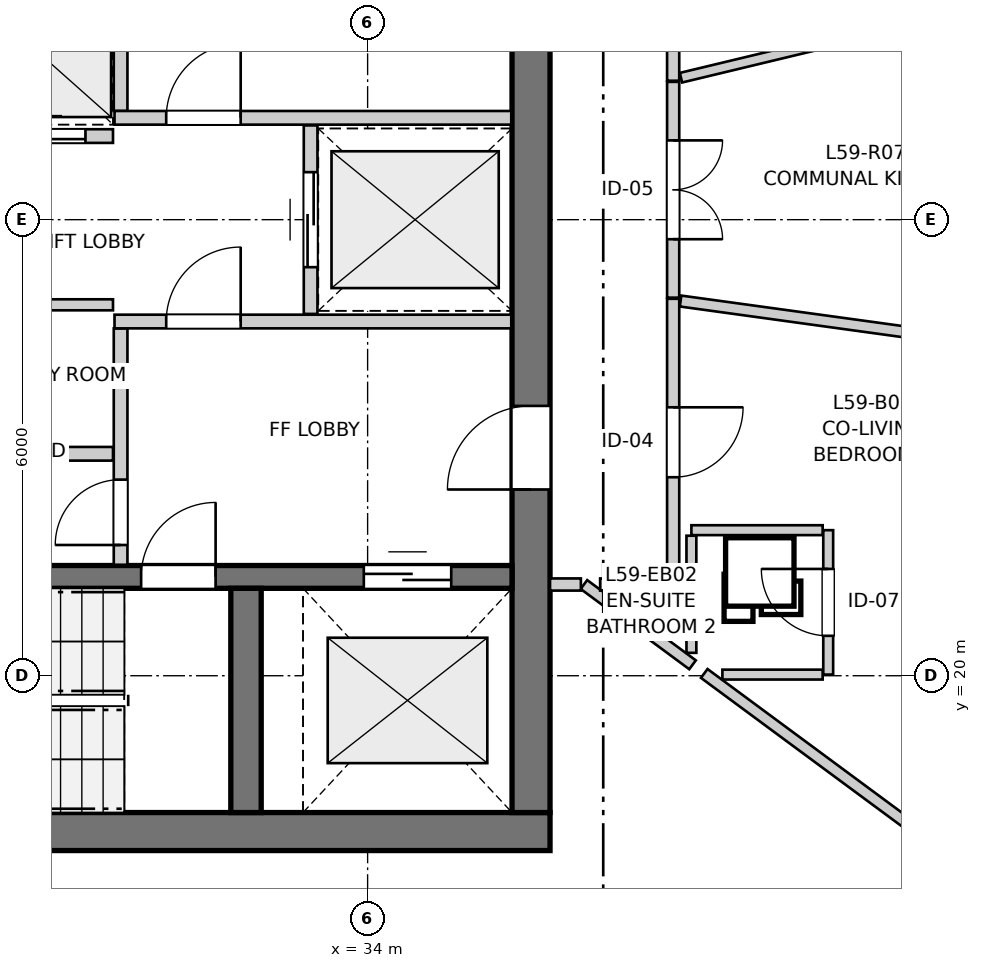
"""IFC4 building model, lengths in metres.
Left out: names, types, materials, properties, quantities, classifications, styles, units other than length and angle.
Written with IfcOpenShell. Run it as: python <this file> out.ifc"""

import sys

from ifc_helpers import new_model, si_unit, direction, frame, frame_2d, origin, place, context, subcontext, project, spatial, rectangle, extrude, source, transform, mapped, element, fill, save


model = new_model("IFC4")
c1 = context("Model", 3, precision=1e-05, world=origin(), true_north=direction((0.0, 1.0)))
c2 = subcontext(c1, "Body", "Model", "MODEL_VIEW")
j1 = project(units=[si_unit("LENGTHUNIT", "METRE"), si_unit("PLANEANGLEUNIT", "RADIAN")], contexts=[c1])
p1 = place(None, origin())
s1 = spatial("IfcSite", under=j1, at=p1, CompositionType="ELEMENT")
p2 = place(p1, origin())
s2 = spatial("IfcBuilding", under=s1, at=p2, CompositionType="ELEMENT")
p3 = place(p2, frame((0.0, 0.0, 198.8)))
s3 = spatial("IfcBuildingStorey", under=s2, at=p3, CompositionType="ELEMENT", Elevation=198.8)
p4 = place(p3, frame((24.3, 17.95, 0.0), z_axis=(0.0, 0.0, 1.0), x_axis=(1.0, 0.0, 0.0)))
e1 = element("IfcWall", 1, at=p4, inside=s3, PredefinedType="SHEAR", context=c2, shape_type="SweptSolid", body=[
    extrude(rectangle(XDim=12.1, YDim=0.5, at=frame_2d((6.05, 0.0))), origin(), (0.0, 0.0, 1.0), 2.96),
])
p5 = place(p3, frame((36.15, 18.2, 0.0), z_axis=(0.0, 0.0, 1.0), x_axis=(0.0, 1.0, 0.0)))
e2 = element("IfcWall", 2, at=p5, inside=s3, PredefinedType="SHEAR", context=c2, shape_type="SweptSolid", body=[
    extrude(rectangle(XDim=15.6, YDim=0.5, at=frame_2d((7.8, 0.0))), origin(), (0.0, 0.0, 1.0), 2.96),
])
p6 = place(p5, frame((4.25, 0.0, 0.0)))
e3 = element("IfcOpeningElement", 3, at=p6, cuts=e2, PredefinedType="OPENING", context=c2, shape_type="SweptSolid", body=[
    extrude(rectangle(XDim=1.1, YDim=2.15, at=frame_2d((0.55, 1.075))), frame((0.0, 0.26, 0.0), z_axis=(0.0, -1.0, 0.0), x_axis=(1.0, 0.0, 0.0)), (0.0, 0.0, 1.0), 0.52),
])
p7 = place(p5, frame((10.25, 0.0, 0.0)))
e4 = element("IfcOpeningElement", 4, at=p7, cuts=e2, PredefinedType="OPENING", context=c2, shape_type="SweptSolid", body=[
    extrude(rectangle(XDim=1.1, YDim=2.15, at=frame_2d((0.55, 1.075))), frame((0.0, 0.26, 0.0), z_axis=(0.0, -1.0, 0.0), x_axis=(1.0, 0.0, 0.0)), (0.0, 0.0, 1.0), 0.52),
])
p8 = place(p3, frame((24.8, 21.3, 0.0), z_axis=(0.0, 0.0, 1.0), x_axis=(1.0, 0.0, 0.0)))
e5 = element("IfcWall", 5, at=p8, inside=s3, PredefinedType="SHEAR", context=c2, shape_type="SweptSolid", body=[
    extrude(rectangle(XDim=11.1, YDim=0.3, at=frame_2d((5.55, 0.0))), origin(), (0.0, 0.0, 1.0), 2.96),
])
p9 = place(p8, frame((6.22, 0.0, 0.0)))
e6 = element("IfcOpeningElement", 6, at=p9, cuts=e5, PredefinedType="OPENING", context=c2, shape_type="SweptSolid", body=[
    extrude(rectangle(XDim=0.98, YDim=2.15, at=frame_2d((0.49, 1.075))), frame((0.0, 0.16, 0.0), z_axis=(0.0, -1.0, 0.0), x_axis=(1.0, 0.0, 0.0)), (0.0, 0.0, 1.0), 0.32),
])
p10 = place(p8, frame((9.15, 0.0, 0.0)))
e7 = element("IfcOpeningElement", 7, at=p10, cuts=e5, PredefinedType="OPENING", context=c2, shape_type="SweptSolid", body=[
    extrude(rectangle(XDim=1.15, YDim=2.15, at=frame_2d((0.575, 1.075))), frame((0.0, 0.16, 0.0), z_axis=(0.0, -1.0, 0.0), x_axis=(1.0, 0.0, 0.0)), (0.0, 0.0, 1.0), 0.32),
])
p11 = place(p3, frame((32.4, 18.2, 0.0), z_axis=(0.0, 0.0, 1.0), x_axis=(0.0, 1.0, 0.0)))
e8 = element("IfcWall", 8, at=p11, inside=s3, PredefinedType="SHEAR", context=c2, shape_type="SweptSolid", body=[
    extrude(rectangle(XDim=2.95, YDim=0.4, at=frame_2d((1.475, 0.0))), origin(), (0.0, 0.0, 1.0), 2.96),
])
p12 = place(p3, frame((41.107, 16.748, 0.0), z_axis=(0.0, 0.0, 1.0), x_axis=(0.257000958827, 0.966411148095, 0.0)))
e9 = element("IfcWall", 9, at=p12, inside=s3, PredefinedType="SOLIDWALL", context=c2, shape_type="SweptSolid", body=[
    extrude(rectangle(XDim=2.343, YDim=0.32, at=frame_2d((1.171, 0.0))), origin(), (0.0, 0.0, 1.0), 2.58),
])
p13 = place(p12, frame((0.343, 0.0, 0.82)))
e10 = element("IfcOpeningElement", 10, at=p13, cuts=e9, PredefinedType="OPENING", context=c2, shape_type="SweptSolid", body=[
    extrude(rectangle(XDim=0.58, YDim=1.35, at=frame_2d((0.29, 0.675))), frame((0.0, 0.17, 0.0), z_axis=(0.0, -1.0, 0.0), x_axis=(1.0, 0.0, 0.0)), (0.0, 0.0, 1.0), 0.34),
])
p14 = place(p12, frame((1.399, 0.0, 0.82)))
e11 = element("IfcOpeningElement", 11, at=p14, cuts=e9, PredefinedType="OPENING", context=c2, shape_type="SweptSolid", body=[
    extrude(rectangle(XDim=0.58, YDim=1.35, at=frame_2d((0.29, 0.675))), frame((0.0, 0.17, 0.0), z_axis=(0.0, -1.0, 0.0), x_axis=(1.0, 0.0, 0.0)), (0.0, 0.0, 1.0), 0.34),
])
p15 = place(p3, frame((30.75, 21.46, 0.0), z_axis=(0.0, 0.0, 1.0), x_axis=(0.0, 1.0, 0.0)))
e12 = element("IfcWall", 12, at=p15, inside=s3, PredefinedType="PARTITIONING", context=c2, shape_type="SweptSolid", body=[
    extrude(rectangle(XDim=3.11, YDim=0.18, at=frame_2d((1.555, 0.0))), origin(), (0.0, 0.0, 1.0), 2.96),
])
p16 = place(p15, frame((0.26, 0.0, 0.0)))
e13 = element("IfcOpeningElement", 13, at=p16, cuts=e12, PredefinedType="OPENING", context=c2, shape_type="SweptSolid", body=[
    extrude(rectangle(XDim=0.86, YDim=2.05, at=frame_2d((0.43, 1.025))), frame((0.0, 0.1, 0.0), z_axis=(0.0, -1.0, 0.0), x_axis=(1.0, 0.0, 0.0)), (0.0, 0.0, 1.0), 0.2),
])
p17 = place(p3, frame((30.67, 24.66, 0.0), z_axis=(0.0, 0.0, 1.0), x_axis=(1.0, 0.0, 0.0)))
e14 = element("IfcWall", 14, at=p17, inside=s3, PredefinedType="PARTITIONING", context=c2, shape_type="SweptSolid", body=[
    extrude(rectangle(XDim=5.22, YDim=0.18, at=frame_2d((2.61, 0.0))), origin(), (0.0, 0.0, 1.0), 2.96),
])
p18 = place(p17, frame((0.68, 0.0, 0.0)))
e15 = element("IfcOpeningElement", 15, at=p18, cuts=e14, PredefinedType="OPENING", context=c2, shape_type="SweptSolid", body=[
    extrude(rectangle(XDim=0.98, YDim=2.15, at=frame_2d((0.49, 1.075))), frame((0.0, 0.1, 0.0), z_axis=(0.0, -1.0, 0.0), x_axis=(1.0, 0.0, 0.0)), (0.0, 0.0, 1.0), 0.2),
])
p19 = place(p3, frame((30.75, 27.43, 0.0), z_axis=(0.0, 0.0, 1.0), x_axis=(0.0, 1.0, 0.0)))
e16 = element("IfcWall", 16, at=p19, inside=s3, PredefinedType="PARTITIONING", context=c2, shape_type="SweptSolid", body=[
    extrude(rectangle(XDim=3.11, YDim=0.18, at=frame_2d((1.555, 0.0))), origin(), (0.0, 0.0, 1.0), 2.96),
])
p20 = place(p19, frame((1.98, 0.0, 0.0)))
e17 = element("IfcOpeningElement", 17, at=p20, cuts=e16, PredefinedType="OPENING", context=c2, shape_type="SweptSolid", body=[
    extrude(rectangle(XDim=0.86, YDim=2.05, at=frame_2d((0.43, 1.025))), frame((0.0, 0.1, 0.0), z_axis=(0.0, -1.0, 0.0), x_axis=(1.0, 0.0, 0.0)), (0.0, 0.0, 1.0), 0.2),
])
p21 = place(p3, frame((30.67, 27.34, 0.0), z_axis=(0.0, 0.0, 1.0), x_axis=(1.0, 0.0, 0.0)))
e18 = element("IfcWall", 18, at=p21, inside=s3, PredefinedType="PARTITIONING", context=c2, shape_type="SweptSolid", body=[
    extrude(rectangle(XDim=5.22, YDim=0.18, at=frame_2d((2.61, 0.0))), origin(), (0.0, 0.0, 1.0), 2.96),
])
p22 = place(p21, frame((0.68, 0.0, 0.0)))
e19 = element("IfcOpeningElement", 19, at=p22, cuts=e18, PredefinedType="OPENING", context=c2, shape_type="SweptSolid", body=[
    extrude(rectangle(XDim=0.98, YDim=2.15, at=frame_2d((0.49, 1.075))), frame((0.0, 0.1, 0.0), z_axis=(0.0, -1.0, 0.0), x_axis=(1.0, 0.0, 0.0)), (0.0, 0.0, 1.0), 0.2),
])
p23 = place(p3, frame((33.25, 24.76, 0.0), z_axis=(0.0, 0.0, 1.0), x_axis=(0.0, 1.0, 0.0)))
e20 = element("IfcWall", 20, at=p23, inside=s3, PredefinedType="PARTITIONING", context=c2, shape_type="SweptSolid", body=[
    extrude(rectangle(XDim=2.48, YDim=0.18, at=frame_2d((1.24, 0.0))), origin(), (0.0, 0.0, 1.0), 2.96),
])
p24 = place(p23, frame((0.615, 0.0, 0.0)))
e21 = element("IfcOpeningElement", 21, at=p24, cuts=e20, PredefinedType="OPENING", context=c2, shape_type="SweptSolid", body=[
    extrude(rectangle(XDim=1.25, YDim=2.15, at=frame_2d((0.625, 1.075))), frame((0.0, 0.1, 0.0), z_axis=(0.0, -1.0, 0.0), x_axis=(1.0, 0.0, 0.0)), (0.0, 0.0, 1.0), 0.2),
])
p25 = place(p3, frame((24.81, 22.92, 0.0), z_axis=(0.0, 0.0, 1.0), x_axis=(1.0, 0.0, 0.0)))
e22 = element("IfcWall", 22, at=p25, inside=s3, PredefinedType="PARTITIONING", context=c2, shape_type="SweptSolid", body=[
    extrude(rectangle(XDim=5.84, YDim=0.18, at=frame_2d((2.92, 0.0))), origin(), (0.0, 0.0, 1.0), 2.96),
])
p26 = place(p3, frame((24.81, 24.88, 0.0), z_axis=(0.0, 0.0, 1.0), x_axis=(1.0, 0.0, 0.0)))
e23 = element("IfcWall", 23, at=p26, inside=s3, PredefinedType="PARTITIONING", context=c2, shape_type="SweptSolid", body=[
    extrude(rectangle(XDim=5.84, YDim=0.145, at=frame_2d((2.92, 0.0))), origin(), (0.0, 0.0, 1.0), 2.96),
])
p27 = place(p26, frame((2.4, 0.0, 0.0)))
e24 = element("IfcOpeningElement", 24, at=p27, cuts=e23, PredefinedType="OPENING", context=c2, shape_type="SweptSolid", body=[
    extrude(rectangle(XDim=0.96, YDim=2.1, at=frame_2d((0.48, 1.05))), frame((0.0, 0.083, 0.0), z_axis=(0.0, -1.0, 0.0), x_axis=(1.0, 0.0, 0.0)), (0.0, 0.0, 1.0), 0.165),
])
p28 = place(p3, frame((28.825, 27.1, 0.0), z_axis=(0.0, 0.0, 1.0), x_axis=(1.0, 0.0, 0.0)))
e25 = element("IfcWall", 25, at=p28, inside=s3, PredefinedType="PARTITIONING", context=c2, shape_type="SweptSolid", body=[
    extrude(rectangle(XDim=1.825, YDim=0.18, at=frame_2d((0.913, 0.0))), origin(), (0.0, 0.0, 1.0), 2.96),
])
p29 = place(p28, frame((0.363, 0.0, 0.0)))
e26 = element("IfcOpeningElement", 26, at=p29, cuts=e25, PredefinedType="OPENING", context=c2, shape_type="SweptSolid", body=[
    extrude(rectangle(XDim=1.1, YDim=2.15, at=frame_2d((0.55, 1.075))), frame((0.0, 0.1, 0.0), z_axis=(0.0, -1.0, 0.0), x_axis=(1.0, 0.0, 0.0)), (0.0, 0.0, 1.0), 0.2),
])
p30 = place(p3, frame((38.02, 24.959, 0.0), z_axis=(0.0, 0.0, 1.0), x_axis=(0.0, -1.0, 0.0)))
e27 = element("IfcWall", 27, at=p30, inside=s3, PredefinedType="PARTITIONING", context=c2, shape_type="SweptSolid", body=[
    extrude(rectangle(XDim=3.759, YDim=0.16, at=frame_2d((1.879, 0.0))), origin(), (0.0, 0.0, 1.0), 2.96),
])
p31 = place(p30, frame((1.427, 0.0, 0.0)))
e28 = element("IfcOpeningElement", 28, at=p31, cuts=e27, PredefinedType="OPENING", context=c2, shape_type="SweptSolid", body=[
    extrude(rectangle(XDim=0.92, YDim=2.1, at=frame_2d((0.46, 1.05))), frame((0.0, 0.09, 0.0), z_axis=(0.0, -1.0, 0.0), x_axis=(1.0, 0.0, 0.0)), (0.0, 0.0, 1.0), 0.18),
])
p32 = place(p3, frame((38.02, 31.161, 0.0), z_axis=(0.0, 0.0, 1.0), x_axis=(0.0, -1.0, 0.0)))
e29 = element("IfcWall", 29, at=p32, inside=s3, PredefinedType="PARTITIONING", context=c2, shape_type="SweptSolid", body=[
    extrude(rectangle(XDim=3.333, YDim=0.16, at=frame_2d((1.667, 0.0))), origin(), (0.0, 0.0, 1.0), 2.628),
])
p33 = place(p32, frame((1.193, 0.0, 0.0)))
e30 = element("IfcOpeningElement", 30, at=p33, cuts=e29, PredefinedType="OPENING", context=c2, shape_type="SweptSolid", body=[
    extrude(rectangle(XDim=0.95, YDim=2.1, at=frame_2d((0.475, 1.05))), frame((0.0, 0.09, 0.0), z_axis=(0.0, -1.0, 0.0), x_axis=(1.0, 0.0, 0.0)), (0.0, 0.0, 1.0), 0.18),
])
p34 = place(p3, frame((38.02, 27.813, 0.0), z_axis=(0.0, 0.0, 1.0), x_axis=(0.0, -1.0, 0.0)))
e31 = element("IfcWall", 31, at=p34, inside=s3, PredefinedType="PARTITIONING", context=c2, shape_type="SweptSolid", body=[
    extrude(rectangle(XDim=2.839, YDim=0.16, at=frame_2d((1.419, 0.0))), origin(), (0.0, 0.0, 1.0), 2.96),
])
p35 = place(p34, frame((0.77, 0.0, 0.0)))
e32 = element("IfcOpeningElement", 32, at=p35, cuts=e31, PredefinedType="OPENING", context=c2, shape_type="SweptSolid", body=[
    extrude(rectangle(XDim=1.3, YDim=2.1, at=frame_2d((0.65, 1.05))), frame((0.0, 0.09, 0.0), z_axis=(0.0, -1.0, 0.0), x_axis=(1.0, 0.0, 0.0)), (0.0, 0.0, 1.0), 0.18),
])
p36 = place(p3, frame((40.06, 20.015, 0.0), z_axis=(0.0, 0.0, 1.0), x_axis=(0.0, 1.0, 0.0)))
e33 = element("IfcWall", 33, at=p36, inside=s3, PredefinedType="PARTITIONING", context=c2, shape_type="SweptSolid", body=[
    extrude(rectangle(XDim=1.9, YDim=0.13, at=frame_2d((0.95, 0.0))), origin(), (0.0, 0.0, 1.0), 2.598),
])
p37 = place(p36, frame((0.51, 0.0, 0.0)))
e34 = element("IfcOpeningElement", 34, at=p37, cuts=e33, PredefinedType="OPENING", context=c2, shape_type="SweptSolid", body=[
    extrude(rectangle(XDim=0.88, YDim=2.05, at=frame_2d((0.44, 1.025))), frame((0.0, 0.075, 0.0), z_axis=(0.0, -1.0, 0.0), x_axis=(1.0, 0.0, 0.0)), (0.0, 0.0, 1.0), 0.15),
])
p38 = place(p3, frame((38.118, 24.929, 0.0), z_axis=(0.0, 0.0, 1.0), x_axis=(0.990658246077, -0.136368029533, 0.0)))
e35 = element("IfcWall", 35, at=p38, inside=s3, PredefinedType="PARTITIONING", context=c2, shape_type="SweptSolid", body=[
    extrude(rectangle(XDim=4.202, YDim=0.145, at=frame_2d((2.101, 0.0))), origin(), (0.0, 0.0, 1.0), 2.96),
])
p39 = place(p3, frame((38.123, 27.868, 0.0), z_axis=(0.0, 0.0, 1.0), x_axis=(0.972302502293, 0.233726002051, 0.0)))
e36 = element("IfcWall", 36, at=p39, inside=s3, PredefinedType="PARTITIONING", context=c2, shape_type="SweptSolid", body=[
    extrude(rectangle(XDim=4.185, YDim=0.13, at=frame_2d((2.092, 0.0))), origin(), (0.0, 0.0, 1.0), 2.96),
])
p40 = place(p3, frame((38.429, 20.03, 0.0), z_axis=(0.0, 0.0, 1.0), x_axis=(0.804249944798, -0.594291196546, 0.0)))
e37 = element("IfcWall", 37, at=p40, inside=s3, PredefinedType="PARTITIONING", context=c2, shape_type="SweptSolid", body=[
    extrude(rectangle(XDim=3.506, YDim=0.145, at=frame_2d((1.753, 0.0))), origin(), (0.0, 0.0, 1.0), 2.96),
])
p41 = place(p3, frame((38.26, 21.915, 0.0), z_axis=(0.0, 0.0, 1.0), x_axis=(1.0, 0.0, 0.0)))
e38 = element("IfcWall", 38, at=p41, inside=s3, PredefinedType="PARTITIONING", context=c2, shape_type="SweptSolid", body=[
    extrude(rectangle(XDim=1.727, YDim=0.13, at=frame_2d((0.864, 0.0))), origin(), (0.0, 0.0, 1.0), 2.96),
])
p42 = place(p3, frame((36.846, 21.2, 0.0), z_axis=(0.0, 0.0, 1.0), x_axis=(0.804250382672, -0.594290603974, 0.0)))
e39 = element("IfcWall", 39, at=p42, inside=s3, PredefinedType="PARTITIONING", context=c2, shape_type="SweptSolid", body=[
    extrude(rectangle(XDim=1.777, YDim=0.145, at=frame_2d((0.888, 0.0))), origin(), (0.0, 0.0, 1.0), 2.96),
])
p43 = place(p3, frame((38.26, 20.301, 0.0), z_axis=(0.0, 0.0, 1.0), x_axis=(0.0, 1.0, 0.0)))
e40 = element("IfcWall", 40, at=p43, inside=s3, PredefinedType="PARTITIONING", context=c2, shape_type="SweptSolid", body=[
    extrude(rectangle(XDim=1.541, YDim=0.13, at=frame_2d((0.771, 0.0))), origin(), (0.0, 0.0, 1.0), 2.628),
])
p44 = place(p3, frame((38.668, 20.015, 0.0), z_axis=(0.0, 0.0, 1.0), x_axis=(1.0, 0.0, 0.0)))
e41 = element("IfcWall", 41, at=p44, inside=s3, PredefinedType="PARTITIONING", context=c2, shape_type="SweptSolid", body=[
    extrude(rectangle(XDim=1.319, YDim=0.13, at=frame_2d((0.66, 0.0))), origin(), (0.0, 0.0, 1.0), 2.96),
])
p45 = place(p3, frame((37.059, 21.2, 0.0), z_axis=(0.0, 0.0, 1.0), x_axis=(1.0, 0.0, 0.0)))
e42 = element("IfcWall", 42, at=p45, inside=s3, PredefinedType="PARTITIONING", context=c2, shape_type="SweptSolid", body=[
    extrude(rectangle(XDim=0.873, YDim=0.16, at=frame_2d((0.437, 0.0))), origin(), (0.0, 0.0, 1.0), 2.96),
])
p46 = place(p3, frame((36.4, 21.2, 0.0), z_axis=(0.0, 0.0, 1.0), x_axis=(1.0, 0.0, 0.0)))
e43 = element("IfcWall", 43, at=p46, inside=s3, PredefinedType="PARTITIONING", context=c2, shape_type="SweptSolid", body=[
    extrude(rectangle(XDim=0.406, YDim=0.16, at=frame_2d((0.203, 0.0))), origin(), (0.0, 0.0, 1.0), 2.96),
])
m1 = source(origin(), c2, "Body", "SweptSolid", [
    extrude(rectangle(XDim=0.98, YDim=2.15, at=frame_2d((0.49, 1.075))), frame((0.0, 0.025, 0.0), z_axis=(0.0, -1.0, 0.0), x_axis=(1.0, 0.0, 0.0)), (0.0, 0.0, 1.0), 0.05),
])
p47 = place(p9, origin())
e44 = element("IfcDoor", 44, at=p47, inside=s3, OperationType="SINGLE_SWING_RIGHT", PredefinedType="DOOR", context=c2, shape_type="MappedRepresentation", body=[
    mapped(m1, transform((0.0, 0.0, 0.0), x_axis=(1.0, 0.0, 0.0), y_axis=(0.0, 1.0, 0.0), z_axis=(0.0, 0.0, 1.0), scale=1.0)),
])
fill(e6, e44)
m2 = source(origin(), c2, "Body", "SweptSolid", [
    extrude(rectangle(XDim=1.15, YDim=2.15, at=frame_2d((0.575, 1.075))), frame((0.0, 0.025, 0.0), z_axis=(0.0, -1.0, 0.0), x_axis=(1.0, 0.0, 0.0)), (0.0, 0.0, 1.0), 0.05),
])
p48 = place(p10, origin())
e45 = element("IfcDoor", 45, at=p48, inside=s3, OperationType="DOUBLE_DOOR_SLIDING", PredefinedType="DOOR", context=c2, shape_type="MappedRepresentation", body=[
    mapped(m2, transform((0.0, 0.0, 0.0), x_axis=(1.0, 0.0, 0.0), y_axis=(0.0, 1.0, 0.0), z_axis=(0.0, 0.0, 1.0), scale=1.0)),
])
fill(e7, e45)
m3 = source(origin(), c2, "Body", "SweptSolid", [
    extrude(rectangle(XDim=1.1, YDim=2.15, at=frame_2d((0.55, 1.075))), frame((0.0, 0.025, 0.0), z_axis=(0.0, -1.0, 0.0), x_axis=(1.0, 0.0, 0.0)), (0.0, 0.0, 1.0), 0.05),
])
p49 = place(p6, origin())
e46 = element("IfcDoor", 46, at=p49, inside=s3, OperationType="SINGLE_SWING_LEFT", PredefinedType="DOOR", context=c2, shape_type="MappedRepresentation", body=[
    mapped(m3, transform((0.0, 0.0, 0.0), x_axis=(1.0, 0.0, 0.0), y_axis=(0.0, 1.0, 0.0), z_axis=(0.0, 0.0, 1.0), scale=1.0)),
])
fill(e3, e46)
m4 = source(origin(), c2, "Body", "SweptSolid", [
    extrude(rectangle(XDim=0.86, YDim=2.05, at=frame_2d((0.43, 1.025))), frame((0.0, 0.025, 0.0), z_axis=(0.0, -1.0, 0.0), x_axis=(1.0, 0.0, 0.0)), (0.0, 0.0, 1.0), 0.05),
])
p50 = place(p16, origin())
e47 = element("IfcDoor", 47, at=p50, inside=s3, OperationType="SINGLE_SWING_LEFT", PredefinedType="DOOR", context=c2, shape_type="MappedRepresentation", body=[
    mapped(m4, transform((0.0, 0.0, 0.0), x_axis=(1.0, 0.0, 0.0), y_axis=(0.0, 1.0, 0.0), z_axis=(0.0, 0.0, 1.0), scale=1.0)),
])
fill(e13, e47)
p51 = place(p18, origin())
e48 = element("IfcDoor", 48, at=p51, inside=s3, OperationType="SINGLE_SWING_RIGHT", PredefinedType="DOOR", context=c2, shape_type="MappedRepresentation", body=[
    mapped(m1, transform((0.0, 0.0, 0.0), x_axis=(1.0, 0.0, 0.0), y_axis=(0.0, 1.0, 0.0), z_axis=(0.0, 0.0, 1.0), scale=1.0)),
])
fill(e15, e48)
p52 = place(p22, origin())
e49 = element("IfcDoor", 49, at=p52, inside=s3, OperationType="SINGLE_SWING_RIGHT", PredefinedType="DOOR", context=c2, shape_type="MappedRepresentation", body=[
    mapped(m1, transform((0.0, 0.0, 0.0), x_axis=(1.0, 0.0, 0.0), y_axis=(0.0, 1.0, 0.0), z_axis=(0.0, 0.0, 1.0), scale=1.0)),
])
fill(e19, e49)
m5 = source(origin(), c2, "Body", "SweptSolid", [
    extrude(rectangle(XDim=1.25, YDim=2.15, at=frame_2d((0.625, 1.075))), frame((0.0, 0.025, 0.0), z_axis=(0.0, -1.0, 0.0), x_axis=(1.0, 0.0, 0.0)), (0.0, 0.0, 1.0), 0.05),
])
p53 = place(p24, origin())
e50 = element("IfcDoor", 50, at=p53, inside=s3, OperationType="DOUBLE_DOOR_SLIDING", PredefinedType="DOOR", context=c2, shape_type="MappedRepresentation", body=[
    mapped(m5, transform((0.0, 0.0, 0.0), x_axis=(1.0, 0.0, 0.0), y_axis=(0.0, 1.0, 0.0), z_axis=(0.0, 0.0, 1.0), scale=1.0)),
])
fill(e21, e50)
p54 = place(p29, origin())
e51 = element("IfcDoor", 51, at=p54, inside=s3, OperationType="DOUBLE_DOOR_SLIDING", PredefinedType="DOOR", context=c2, shape_type="MappedRepresentation", body=[
    mapped(m3, transform((0.0, 0.0, 0.0), x_axis=(1.0, 0.0, 0.0), y_axis=(0.0, 1.0, 0.0), z_axis=(0.0, 0.0, 1.0), scale=1.0)),
])
fill(e26, e51)
m6 = source(origin(), c2, "Body", "SweptSolid", [
    extrude(rectangle(XDim=0.92, YDim=2.1, at=frame_2d((0.46, 1.05))), frame((0.0, 0.025, 0.0), z_axis=(0.0, -1.0, 0.0), x_axis=(1.0, 0.0, 0.0)), (0.0, 0.0, 1.0), 0.05),
])
p55 = place(p31, origin())
e52 = element("IfcDoor", 52, at=p55, inside=s3, OperationType="SINGLE_SWING_LEFT", PredefinedType="DOOR", context=c2, shape_type="MappedRepresentation", body=[
    mapped(m6, transform((0.0, 0.0, 0.0), x_axis=(1.0, 0.0, 0.0), y_axis=(0.0, 1.0, 0.0), z_axis=(0.0, 0.0, 1.0), scale=1.0)),
])
fill(e28, e52)
m7 = source(origin(), c2, "Body", "SweptSolid", [
    extrude(rectangle(XDim=1.3, YDim=2.1, at=frame_2d((0.65, 1.05))), frame((0.0, 0.025, 0.0), z_axis=(0.0, -1.0, 0.0), x_axis=(1.0, 0.0, 0.0)), (0.0, 0.0, 1.0), 0.05),
])
p56 = place(p35, origin())
e53 = element("IfcDoor", 53, at=p56, inside=s3, OperationType="DOUBLE_DOOR_SINGLE_SWING", PredefinedType="DOOR", context=c2, shape_type="MappedRepresentation", body=[
    mapped(m7, transform((0.0, 0.0, 0.0), x_axis=(1.0, 0.0, 0.0), y_axis=(0.0, 1.0, 0.0), z_axis=(0.0, 0.0, 1.0), scale=1.0)),
])
fill(e32, e53)
m8 = source(origin(), c2, "Body", "SweptSolid", [
    extrude(rectangle(XDim=0.88, YDim=2.05, at=frame_2d((0.44, 1.025))), frame((0.0, 0.025, 0.0), z_axis=(0.0, -1.0, 0.0), x_axis=(1.0, 0.0, 0.0)), (0.0, 0.0, 1.0), 0.05),
])
p57 = place(p37, origin())
e54 = element("IfcDoor", 54, at=p57, inside=s3, OperationType="SINGLE_SWING_RIGHT", PredefinedType="DOOR", context=c2, shape_type="MappedRepresentation", body=[
    mapped(m8, transform((0.0, 0.0, 0.0), x_axis=(1.0, 0.0, 0.0), y_axis=(0.0, 1.0, 0.0), z_axis=(0.0, 0.0, 1.0), scale=1.0)),
])
fill(e34, e54)
save(model, sys.argv[1])
